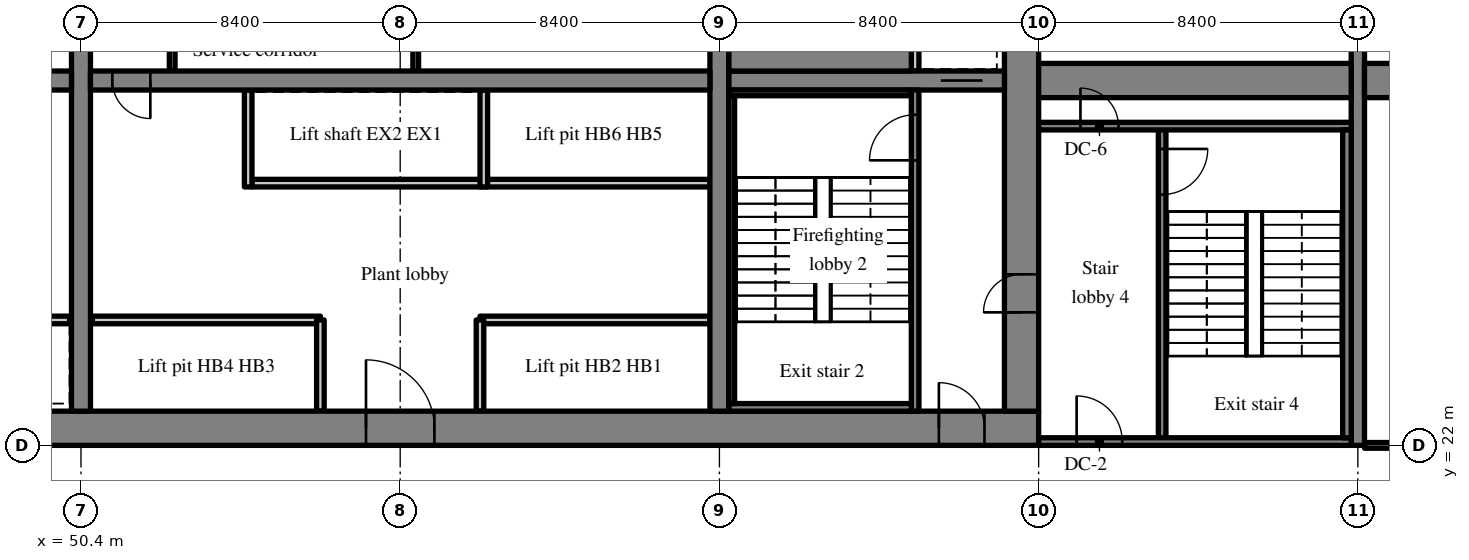
"""IFC4 building model, lengths in metres.
Left out: names, types, materials, properties, quantities, classifications, styles, units other than length and angle.
Written with IfcOpenShell. Run it as: python <this file> out.ifc"""

import sys

from ifc_helpers import new_model, si_unit, direction, frame, frame_2d, origin, place, context, subcontext, project, spatial, rectangle, extrude, source, transform, mapped, element, fill, save


model = new_model("IFC4")
c1 = context("Model", 3, precision=1e-05, world=origin(), true_north=direction((0.0, 1.0)))
c2 = subcontext(c1, "Body", "Model", "MODEL_VIEW")
j1 = project(units=[si_unit("LENGTHUNIT", "METRE"), si_unit("PLANEANGLEUNIT", "RADIAN")], contexts=[c1])
p1 = place(None, origin())
s1 = spatial("IfcSite", under=j1, at=p1, CompositionType="ELEMENT")
p2 = place(p1, origin())
s2 = spatial("IfcBuilding", under=s1, at=p2, CompositionType="ELEMENT")
p3 = place(p2, frame((0.0, 0.0, 140.8)))
s3 = spatial("IfcBuildingStorey", under=s2, at=p3, CompositionType="ELEMENT", Elevation=140.8)
m1 = source(origin(), c2, "Body", "SweptSolid", [
    extrude(rectangle(XDim=50.4, YDim=0.9, at=frame_2d((25.2, 0.0))), origin(), (0.0, 0.0, 1.0), 5.12),
])
p4 = place(p3, frame((25.2, 22.45, 0.0), z_axis=(0.0, 0.0, 1.0), x_axis=(1.0, 0.0, 0.0)))
e1 = element("IfcWall", 1, at=p4, inside=s3, PredefinedType="SHEAR", context=c2, shape_type="MappedRepresentation", body=[
    mapped(m1, transform((0.0, 0.0, 0.0), scale=1.0)),
])
m2 = source(origin(), c2, "Body", "SweptSolid", [
    extrude(rectangle(XDim=1.8, YDim=2.1, at=frame_2d((0.9, 1.05))), frame((0.0, 0.46, 0.0), z_axis=(0.0, -1.0, 0.0), x_axis=(1.0, 0.0, 0.0)), (0.0, 0.0, 1.0), 0.92),
])
p5 = place(p4, frame((15.9, 0.0, 0.0)))
e2 = element("IfcOpeningElement", 2, at=p5, cuts=e1, PredefinedType="OPENING", context=c2, shape_type="MappedRepresentation", body=[
    mapped(m2, transform((0.0, 0.0, 0.0), scale=1.0)),
])
p6 = place(p4, frame((32.7, 0.0, 0.0)))
e3 = element("IfcOpeningElement", 3, at=p6, cuts=e1, PredefinedType="OPENING", context=c2, shape_type="MappedRepresentation", body=[
    mapped(m2, transform((0.0, 0.0, 0.0), scale=1.0)),
])
m3 = source(origin(), c2, "Body", "SweptSolid", [
    extrude(rectangle(XDim=1.2, YDim=2.1, at=frame_2d((0.6, 1.05))), frame((0.0, 0.46, 0.0), z_axis=(0.0, -1.0, 0.0), x_axis=(1.0, 0.0, 0.0)), (0.0, 0.0, 1.0), 0.92),
])
p7 = place(p4, frame((6.45, 0.0, 0.0)))
e4 = element("IfcOpeningElement", 4, at=p7, cuts=e1, PredefinedType="OPENING", context=c2, shape_type="MappedRepresentation", body=[
    mapped(m3, transform((0.0, 0.0, 0.0), scale=1.0)),
])
p8 = place(p4, frame((47.775, 0.0, 0.0)))
e5 = element("IfcOpeningElement", 5, at=p8, cuts=e1, PredefinedType="OPENING", context=c2, shape_type="MappedRepresentation", body=[
    mapped(m3, transform((0.0, 0.0, 0.0), scale=1.0)),
])
m4 = source(origin(), c2, "Body", "SweptSolid", [
    extrude(rectangle(XDim=18.2, YDim=0.9, at=frame_2d((9.1, 0.0))), origin(), (0.0, 0.0, 1.0), 5.12),
])
p9 = place(p3, frame((75.15, 22.9, 0.0), z_axis=(0.0, 0.0, 1.0), x_axis=(0.0, 1.0, 0.0)))
e6 = element("IfcWall", 6, at=p9, inside=s3, PredefinedType="SHEAR", context=c2, shape_type="MappedRepresentation", body=[
    mapped(m4, transform((0.0, 0.0, 0.0), scale=1.0)),
])
m5 = source(origin(), c2, "Body", "SweptSolid", [
    extrude(rectangle(XDim=1.0, YDim=2.1, at=frame_2d((0.5, 1.05))), frame((0.0, 0.46, 0.0), z_axis=(0.0, -1.0, 0.0), x_axis=(1.0, 0.0, 0.0)), (0.0, 0.0, 1.0), 0.92),
])
p10 = place(p9, frame((2.6, 0.0, 0.0)))
e7 = element("IfcOpeningElement", 7, at=p10, cuts=e6, PredefinedType="OPENING", context=c2, shape_type="MappedRepresentation", body=[
    mapped(m5, transform((0.0, 0.0, 0.0), scale=1.0)),
])
p11 = place(p9, frame((12.5, 0.0, 0.0)))
e8 = element("IfcOpeningElement", 8, at=p11, cuts=e6, PredefinedType="OPENING", context=c2, shape_type="MappedRepresentation", body=[
    mapped(m3, transform((0.0, 0.0, 0.0), scale=1.0)),
])
m6 = source(origin(), c2, "Body", "SweptSolid", [
    extrude(rectangle(XDim=18.2, YDim=0.5, at=frame_2d((9.1, 0.0))), origin(), (0.0, 0.0, 1.0), 5.12),
])
p12 = place(p3, frame((50.4, 22.9, 0.0), z_axis=(0.0, 0.0, 1.0), x_axis=(0.0, 1.0, 0.0)))
e9 = element("IfcWall", 9, at=p12, inside=s3, PredefinedType="SHEAR", context=c2, shape_type="MappedRepresentation", body=[
    mapped(m6, transform((0.0, 0.0, 0.0), scale=1.0)),
])
m7 = source(origin(), c2, "Body", "SweptSolid", [
    extrude(rectangle(XDim=1.1, YDim=2.1, at=frame_2d((0.55, 1.05))), frame((0.0, 0.26, 0.0), z_axis=(0.0, -1.0, 0.0), x_axis=(1.0, 0.0, 0.0)), (0.0, 0.0, 1.0), 0.52),
])
p13 = place(p12, frame((12.55, 0.0, 0.0)))
e10 = element("IfcOpeningElement", 10, at=p13, cuts=e9, PredefinedType="OPENING", context=c2, shape_type="MappedRepresentation", body=[
    mapped(m7, transform((0.0, 0.0, 0.0), scale=1.0)),
])
p14 = place(p3, frame((67.2, 22.9, 0.0), z_axis=(0.0, 0.0, 1.0), x_axis=(0.0, 1.0, 0.0)))
e11 = element("IfcWall", 11, at=p14, inside=s3, PredefinedType="SHEAR", context=c2, shape_type="MappedRepresentation", body=[
    mapped(m6, transform((0.0, 0.0, 0.0), scale=1.0)),
])
m8 = source(origin(), c2, "Body", "SweptSolid", [
    extrude(rectangle(XDim=16.3, YDim=0.5, at=frame_2d((8.15, 0.0))), origin(), (0.0, 0.0, 1.0), 5.12),
])
p15 = place(p3, frame((33.85, 31.6, 0.0), z_axis=(0.0, 0.0, 1.0), x_axis=(1.0, 0.0, 0.0)))
e12 = element("IfcWall", 12, at=p15, inside=s3, PredefinedType="SHEAR", context=c2, shape_type="MappedRepresentation", body=[
    mapped(m8, transform((0.0, 0.0, 0.0), scale=1.0)),
])
m9 = source(origin(), c2, "Body", "SweptSolid", [
    extrude(rectangle(XDim=1.0, YDim=2.1, at=frame_2d((0.5, 1.05))), frame((0.0, 0.26, 0.0), z_axis=(0.0, -1.0, 0.0), x_axis=(1.0, 0.0, 0.0)), (0.0, 0.0, 1.0), 0.52),
])
p16 = place(p15, frame((14.725, 0.0, 0.0)))
e13 = element("IfcOpeningElement", 13, at=p16, cuts=e12, PredefinedType="OPENING", context=c2, shape_type="MappedRepresentation", body=[
    mapped(m9, transform((0.0, 0.0, 0.0), scale=1.0)),
])
m10 = source(origin(), c2, "Body", "SweptSolid", [
    extrude(rectangle(XDim=16.3, YDim=0.5, at=frame_2d((8.15, 0.0))), origin(), (0.0, 0.0, 1.0), 5.12),
])
p17 = place(p3, frame((50.65, 31.6, 0.0), z_axis=(0.0, 0.0, 1.0), x_axis=(1.0, 0.0, 0.0)))
e14 = element("IfcWall", 14, at=p17, inside=s3, PredefinedType="SHEAR", context=c2, shape_type="MappedRepresentation", body=[
    mapped(m10, transform((0.0, 0.0, 0.0), scale=1.0)),
])
p18 = place(p17, frame((0.575, 0.0, 0.0)))
e15 = element("IfcOpeningElement", 15, at=p18, cuts=e14, PredefinedType="OPENING", context=c2, shape_type="MappedRepresentation", body=[
    mapped(m9, transform((0.0, 0.0, 0.0), scale=1.0)),
])
m11 = source(origin(), c2, "Body", "SweptSolid", [
    extrude(rectangle(XDim=7.25, YDim=0.5, at=frame_2d((3.625, 0.0))), origin(), (0.0, 0.0, 1.0), 5.12),
])
p19 = place(p3, frame((67.45, 31.6, 0.0), z_axis=(0.0, 0.0, 1.0), x_axis=(1.0, 0.0, 0.0)))
e16 = element("IfcWall", 16, at=p19, inside=s3, PredefinedType="SHEAR", context=c2, shape_type="MappedRepresentation", body=[
    mapped(m11, transform((0.0, 0.0, 0.0), scale=1.0)),
])
p20 = place(p19, frame((5.575, 0.0, 0.0)))
e17 = element("IfcOpeningElement", 17, at=p20, cuts=e16, PredefinedType="OPENING", context=c2, shape_type="MappedRepresentation", body=[
    mapped(m7, transform((0.0, 0.0, 0.0), scale=1.0)),
])
m12 = source(origin(), c2, "Body", "SweptSolid", [
    extrude(rectangle(XDim=20.0, YDim=0.35, at=frame_2d((10.0, 0.0))), origin(), (0.0, 0.0, 1.0), 5.12),
])
p21 = place(p3, frame((84.0, 22.0, 0.0), z_axis=(0.0, 0.0, 1.0), x_axis=(0.0, 1.0, 0.0)))
e18 = element("IfcWall", 18, at=p21, inside=s3, PredefinedType="SHEAR", context=c2, shape_type="MappedRepresentation", body=[
    mapped(m12, transform((0.0, 0.0, 0.0), scale=1.0)),
])
m13 = source(origin(), c2, "Body", "SweptSolid", [
    extrude(rectangle(XDim=1.2, YDim=2.1, at=frame_2d((0.6, 1.05))), frame((0.0, 0.185, 0.0), z_axis=(0.0, -1.0, 0.0), x_axis=(1.0, 0.0, 0.0)), (0.0, 0.0, 1.0), 0.37),
])
p22 = place(p21, frame((13.4, 0.0, 0.0)))
e19 = element("IfcOpeningElement", 19, at=p22, cuts=e18, PredefinedType="OPENING", context=c2, shape_type="MappedRepresentation", body=[
    mapped(m13, transform((0.0, 0.0, 0.0), scale=1.0)),
])
m14 = source(origin(), c2, "Body", "SweptSolid", [
    extrude(rectangle(XDim=8.225, YDim=0.9, at=frame_2d((4.112, 0.0))), origin(), (0.0, 0.0, 1.0), 5.12),
])
p23 = place(p3, frame((75.6, 31.6, 0.0), z_axis=(0.0, 0.0, 1.0), x_axis=(1.0, 0.0, 0.0)))
e20 = element("IfcWall", 20, at=p23, inside=s3, PredefinedType="SHEAR", context=c2, shape_type="MappedRepresentation", body=[
    mapped(m14, transform((0.0, 0.0, 0.0), scale=1.0)),
])
m15 = source(origin(), c2, "Body", "SweptSolid", [
    extrude(rectangle(XDim=8.05, YDim=0.9, at=frame_2d((4.025, 0.0))), origin(), (0.0, 0.0, 1.0), 5.12),
])
p24 = place(p3, frame((84.175, 31.6, 0.0), z_axis=(0.0, 0.0, 1.0), x_axis=(1.0, 0.0, 0.0)))
e21 = element("IfcWall", 21, at=p24, inside=s3, PredefinedType="SHEAR", context=c2, shape_type="MappedRepresentation", body=[
    mapped(m15, transform((0.0, 0.0, 0.0), scale=1.0)),
])
m16 = source(origin(), c2, "Body", "SweptSolid", [
    extrude(rectangle(XDim=6.0, YDim=0.2, at=frame_2d((3.0, 0.0))), origin(), (0.0, 0.0, 1.0), 5.12),
])
p25 = place(p3, frame((44.1, 25.3, 0.0), z_axis=(0.0, 0.0, 1.0), x_axis=(1.0, 0.0, 0.0)))
e22 = element("IfcWall", 22, at=p25, inside=s3, PredefinedType="SOLIDWALL", context=c2, shape_type="MappedRepresentation", body=[
    mapped(m16, transform((0.0, 0.0, 0.0), scale=1.0)),
])
m17 = source(origin(), c2, "Body", "SweptSolid", [
    extrude(rectangle(XDim=6.05, YDim=0.2, at=frame_2d((3.025, 0.0))), origin(), (0.0, 0.0, 1.0), 5.12),
])
p26 = place(p3, frame((66.95, 25.3, 0.0), z_axis=(0.0, 0.0, 1.0), x_axis=(-1.0, 0.0, 0.0)))
e23 = element("IfcWall", 23, at=p26, inside=s3, PredefinedType="SOLIDWALL", context=c2, shape_type="MappedRepresentation", body=[
    mapped(m17, transform((0.0, 0.0, 0.0), scale=1.0)),
])
p27 = place(p3, frame((56.7, 25.3, 0.0), z_axis=(0.0, 0.0, 1.0), x_axis=(-1.0, 0.0, 0.0)))
e24 = element("IfcWall", 24, at=p27, inside=s3, PredefinedType="SOLIDWALL", context=c2, shape_type="MappedRepresentation", body=[
    mapped(m16, transform((0.0, 0.0, 0.0), scale=1.0)),
])
m18 = source(origin(), c2, "Body", "SweptSolid", [
    extrude(rectangle(XDim=12.05, YDim=0.2, at=frame_2d((6.025, 0.0))), origin(), (0.0, 0.0, 1.0), 5.12),
])
p28 = place(p3, frame((66.95, 28.9, 0.0), z_axis=(0.0, 0.0, 1.0), x_axis=(-1.0, 0.0, 0.0)))
e25 = element("IfcWall", 25, at=p28, inside=s3, PredefinedType="SOLIDWALL", context=c2, shape_type="MappedRepresentation", body=[
    mapped(m18, transform((0.0, 0.0, 0.0), scale=1.0)),
])
m19 = source(origin(), c2, "Body", "SweptSolid", [
    extrude(rectangle(XDim=2.4, YDim=0.2, at=frame_2d((1.2, 0.0))), origin(), (0.0, 0.0, 1.0), 5.12),
])
for number, where, z_axis, x_axis in (
    (26, (60.9, 22.9, 0.0), (0.0, 0.0, 1.0), (0.0, 1.0, 0.0)),
    (27, (56.7, 22.9, 0.0), (0.0, 0.0, 1.0), (0.0, 1.0, 0.0)),
):
    element("IfcWall", number, at=place(p3, frame(where, z_axis=z_axis, x_axis=x_axis)), inside=s3, PredefinedType="SOLIDWALL", context=c2, shape_type="MappedRepresentation", body=[
        mapped(m19, transform((0.0, 0.0, 0.0), scale=1.0)),
    ])
m20 = source(origin(), c2, "Body", "SweptSolid", [
    extrude(rectangle(XDim=2.55, YDim=0.2, at=frame_2d((1.275, 0.0))), origin(), (0.0, 0.0, 1.0), 5.12),
])
for number, where, z_axis, x_axis in (
    (28, (54.8, 28.8, 0.0), (0.0, 0.0, 1.0), (0.0, 1.0, 0.0)),
    (29, (61.0, 28.8, 0.0), (0.0, 0.0, 1.0), (0.0, 1.0, 0.0)),
):
    element("IfcWall", number, at=place(p3, frame(where, z_axis=z_axis, x_axis=x_axis)), inside=s3, PredefinedType="SOLIDWALL", context=c2, shape_type="MappedRepresentation", body=[
        mapped(m20, transform((0.0, 0.0, 0.0), scale=1.0)),
    ])
m21 = source(origin(), c2, "Body", "SweptSolid", [
    extrude(rectangle(XDim=3.15, YDim=0.15, at=frame_2d((1.575, 0.0))), origin(), (0.0, 0.0, 1.0), 5.12),
])
for number, where, z_axis, x_axis in (
    (30, (52.8, 31.85, 0.0), (0.0, 0.0, 1.0), (0.0, 1.0, 0.0)),
    (31, (59.209, 31.85, 0.0), (0.0, 0.0, 1.0), (0.0, 1.0, 0.0)),
):
    element("IfcWall", number, at=place(p3, frame(where, z_axis=z_axis, x_axis=x_axis)), inside=s3, PredefinedType="PARTITIONING", context=c2, shape_type="MappedRepresentation", body=[
        mapped(m21, transform((0.0, 0.0, 0.0), scale=1.0)),
    ])
m22 = source(origin(), c2, "Body", "SweptSolid", [
    extrude(rectangle(XDim=8.45, YDim=0.2, at=frame_2d((4.225, 0.0))), origin(), (0.0, 0.0, 1.0), 5.12),
])
p29 = place(p3, frame((72.35, 22.9, 0.0), z_axis=(0.0, 0.0, 1.0), x_axis=(0.0, 1.0, 0.0)))
e32 = element("IfcWall", 32, at=p29, inside=s3, PredefinedType="SOLIDWALL", context=c2, shape_type="MappedRepresentation", body=[
    mapped(m22, transform((0.0, 0.0, 0.0), scale=1.0)),
])
m23 = source(origin(), c2, "Body", "SweptSolid", [
    extrude(rectangle(XDim=1.2, YDim=2.1, at=frame_2d((0.6, 1.05))), frame((0.0, 0.11, 0.0), z_axis=(0.0, -1.0, 0.0), x_axis=(1.0, 0.0, 0.0)), (0.0, 0.0, 1.0), 0.22),
])
p30 = place(p29, frame((6.6, 0.0, 0.0)))
e33 = element("IfcOpeningElement", 33, at=p30, cuts=e32, PredefinedType="OPENING", context=c2, shape_type="MappedRepresentation", body=[
    mapped(m23, transform((0.0, 0.0, 0.0), scale=1.0)),
])
m24 = source(origin(), c2, "Body", "SweptSolid", [
    extrude(rectangle(XDim=1.75, YDim=0.2, at=frame_2d((0.875, 0.0))), origin(), (0.0, 0.0, 1.0), 5.12),
])
p31 = place(p3, frame((72.35, 31.85, 0.0), z_axis=(0.0, 0.0, 1.0), x_axis=(0.0, 1.0, 0.0)))
e34 = element("IfcWall", 34, at=p31, inside=s3, PredefinedType="SOLIDWALL", context=c2, shape_type="MappedRepresentation", body=[
    mapped(m24, transform((0.0, 0.0, 0.0), scale=1.0)),
])
m25 = source(origin(), c2, "Body", "SweptSolid", [
    extrude(rectangle(XDim=8.3, YDim=0.2, at=frame_2d((4.15, 0.0))), origin(), (0.0, 0.0, 1.0), 5.12),
])
p32 = place(p3, frame((78.85, 22.1, 0.0), z_axis=(0.0, 0.0, 1.0), x_axis=(0.0, 1.0, 0.0)))
e35 = element("IfcWall", 35, at=p32, inside=s3, PredefinedType="SOLIDWALL", context=c2, shape_type="MappedRepresentation", body=[
    mapped(m25, transform((0.0, 0.0, 0.0), scale=1.0)),
])
p33 = place(p32, frame((6.5, 0.0, 0.0)))
e36 = element("IfcOpeningElement", 36, at=p33, cuts=e35, PredefinedType="OPENING", context=c2, shape_type="MappedRepresentation", body=[
    mapped(m23, transform((0.0, 0.0, 0.0), scale=1.0)),
])
m26 = source(origin(), c2, "Body", "SweptSolid", [
    extrude(rectangle(XDim=8.225, YDim=0.2, at=frame_2d((4.112, 0.0))), origin(), (0.0, 0.0, 1.0), 5.12),
])
p34 = place(p3, frame((83.825, 22.1, 0.0), z_axis=(0.0, 0.0, 1.0), x_axis=(-1.0, 0.0, 0.0)))
e37 = element("IfcWall", 37, at=p34, inside=s3, PredefinedType="SOLIDWALL", context=c2, shape_type="MappedRepresentation", body=[
    mapped(m26, transform((0.0, 0.0, 0.0), scale=1.0)),
])
p35 = place(p34, frame((6.025, 0.0, 0.0)))
e38 = element("IfcOpeningElement", 38, at=p35, cuts=e37, PredefinedType="OPENING", context=c2, shape_type="MappedRepresentation", body=[
    mapped(m23, transform((0.0, 0.0, 0.0), scale=1.0)),
])
p36 = place(p3, frame((83.825, 30.4, 0.0), z_axis=(0.0, 0.0, 1.0), x_axis=(-1.0, 0.0, 0.0)))
e39 = element("IfcWall", 39, at=p36, inside=s3, PredefinedType="SOLIDWALL", context=c2, shape_type="MappedRepresentation", body=[
    mapped(m26, transform((0.0, 0.0, 0.0), scale=1.0)),
])
m27 = source(origin(), c2, "Body", "SweptSolid", [
    extrude(rectangle(XDim=1.0, YDim=2.1, at=frame_2d((0.5, 1.05))), frame((0.0, 0.11, 0.0), z_axis=(0.0, -1.0, 0.0), x_axis=(1.0, 0.0, 0.0)), (0.0, 0.0, 1.0), 0.22),
])
p37 = place(p36, frame((6.125, 0.0, 0.0)))
e40 = element("IfcOpeningElement", 40, at=p37, cuts=e39, PredefinedType="OPENING", context=c2, shape_type="MappedRepresentation", body=[
    mapped(m27, transform((0.0, 0.0, 0.0), scale=1.0)),
])
m28 = source(origin(), c2, "Body", "SweptSolid", [
    extrude(rectangle(XDim=4.8, YDim=0.2, at=frame_2d((2.4, 0.0))), origin(), (0.0, 0.0, 1.0), 5.12),
])
p38 = place(p3, frame((67.45, 23.0, 0.0), z_axis=(0.0, 0.0, 1.0), x_axis=(1.0, 0.0, 0.0)))
e41 = element("IfcWall", 41, at=p38, inside=s3, PredefinedType="SOLIDWALL", context=c2, shape_type="MappedRepresentation", body=[
    mapped(m28, transform((0.0, 0.0, 0.0), scale=1.0)),
])
m29 = source(origin(), c2, "Body", "SweptSolid", [
    extrude(rectangle(XDim=4.8, YDim=0.15, at=frame_2d((2.4, 0.0))), origin(), (0.0, 0.0, 1.0), 5.12),
])
p39 = place(p3, frame((67.45, 31.275, 0.0), z_axis=(0.0, 0.0, 1.0), x_axis=(1.0, 0.0, 0.0)))
e42 = element("IfcWall", 42, at=p39, inside=s3, PredefinedType="SOLIDWALL", context=c2, shape_type="MappedRepresentation", body=[
    mapped(m29, transform((0.0, 0.0, 0.0), scale=1.0)),
])
m30 = source(origin(), c2, "Body", "SweptSolid", [
    extrude(rectangle(XDim=8.1, YDim=0.15, at=frame_2d((4.05, 0.0))), origin(), (0.0, 0.0, 1.0), 5.12),
])
p40 = place(p3, frame((67.525, 23.1, 0.0), z_axis=(0.0, 0.0, 1.0), x_axis=(0.0, 1.0, 0.0)))
e43 = element("IfcWall", 43, at=p40, inside=s3, PredefinedType="SOLIDWALL", context=c2, shape_type="MappedRepresentation", body=[
    mapped(m30, transform((0.0, 0.0, 0.0), scale=1.0)),
])
m31 = source(origin(), c2, "Body", "SweptSolid", [
    extrude(rectangle(XDim=4.8, YDim=0.95, at=frame_2d((2.4, 0.0))), origin(), (0.0, 0.0, 1.0), 5.12),
])
p41 = place(p3, frame((67.45, 32.325, 0.0), z_axis=(0.0, 0.0, 1.0), x_axis=(1.0, 0.0, 0.0)))
e44 = element("IfcWall", 44, at=p41, inside=s3, PredefinedType="SOLIDWALL", context=c2, shape_type="MappedRepresentation", body=[
    mapped(m31, transform((0.0, 0.0, 0.0), scale=1.0)),
])
m32 = source(origin(), c2, "Body", "SweptSolid", [
    extrude(rectangle(XDim=8.1, YDim=0.225, at=frame_2d((4.05, 0.0))), origin(), (0.0, 0.0, 1.0), 5.12),
])
p42 = place(p3, frame((83.713, 22.2, 0.0), z_axis=(0.0, 0.0, 1.0), x_axis=(0.0, 1.0, 0.0)))
e45 = element("IfcWall", 45, at=p42, inside=s3, PredefinedType="SOLIDWALL", context=c2, shape_type="MappedRepresentation", body=[
    mapped(m32, transform((0.0, 0.0, 0.0), scale=1.0)),
])
m33 = source(origin(), c2, "Body", "SweptSolid", [
    extrude(rectangle(XDim=8.05, YDim=0.15, at=frame_2d((4.025, 0.0))), origin(), (0.0, 0.0, 1.0), 4.37),
])
p43 = place(p3, frame((84.175, 22.0, 0.0), z_axis=(0.0, 0.0, 1.0), x_axis=(1.0, 0.0, 0.0)))
e46 = element("IfcWall", 46, at=p43, inside=s3, PredefinedType="PARTITIONING", context=c2, shape_type="MappedRepresentation", body=[
    mapped(m33, transform((0.0, 0.0, 0.0), scale=1.0)),
])
m34 = source(origin(), c2, "Body", "SweptSolid", [
    extrude(rectangle(XDim=1.2, YDim=2.1, at=frame_2d((0.6, 1.05))), frame((0.0, 0.085, 0.0), z_axis=(0.0, -1.0, 0.0), x_axis=(1.0, 0.0, 0.0)), (0.0, 0.0, 1.0), 0.17),
])
p44 = place(p43, frame((3.425, 0.0, 0.0)))
e47 = element("IfcOpeningElement", 47, at=p44, cuts=e46, PredefinedType="OPENING", context=c2, shape_type="MappedRepresentation", body=[
    mapped(m34, transform((0.0, 0.0, 0.0), scale=1.0)),
])
m35 = source(origin(), c2, "Body", "SweptSolid", [
    extrude(rectangle(XDim=1.8, YDim=2.1, at=frame_2d((0.9, 1.05))), frame((0.0, 0.375, 0.0), z_axis=(0.0, -1.0, 0.0), x_axis=(1.0, 0.0, 0.0)), (0.0, 0.0, 1.0), 0.05),
])
p45 = place(p6, origin())
e48 = element("IfcDoor", 48, at=p45, inside=s3, OperationType="DOUBLE_DOOR_SINGLE_SWING", PredefinedType="DOOR", context=c2, shape_type="MappedRepresentation", body=[
    mapped(m35, transform((0.0, 0.0, 0.0), scale=1.0)),
])
fill(e3, e48)
m36 = source(origin(), c2, "Body", "SweptSolid", [
    extrude(rectangle(XDim=1.0, YDim=2.1, at=frame_2d((0.5, 1.05))), frame((0.0, 0.025, 0.0), z_axis=(0.0, -1.0, 0.0), x_axis=(1.0, 0.0, 0.0)), (0.0, 0.0, 1.0), 0.05),
])
p46 = place(p18, origin())
e49 = element("IfcDoor", 49, at=p46, inside=s3, OperationType="SINGLE_SWING_RIGHT", PredefinedType="DOOR", context=c2, shape_type="MappedRepresentation", body=[
    mapped(m36, transform((0.0, 0.0, 0.0), scale=1.0)),
])
fill(e15, e49)
m37 = source(origin(), c2, "Body", "SweptSolid", [
    extrude(rectangle(XDim=1.2, YDim=2.1, at=frame_2d((0.6, 1.05))), frame((0.0, 0.025, 0.0), z_axis=(0.0, -1.0, 0.0), x_axis=(1.0, 0.0, 0.0)), (0.0, 0.0, 1.0), 0.05),
])
p47 = place(p30, origin())
e50 = element("IfcDoor", 50, at=p47, inside=s3, OperationType="SINGLE_SWING_LEFT", PredefinedType="DOOR", context=c2, shape_type="MappedRepresentation", body=[
    mapped(m37, transform((0.0, 0.0, 0.0), scale=1.0)),
])
fill(e33, e50)
m38 = source(origin(), c2, "Body", "SweptSolid", [
    extrude(rectangle(XDim=1.2, YDim=2.1, at=frame_2d((0.6, 1.05))), frame((0.0, 0.375, 0.0), z_axis=(0.0, -1.0, 0.0), x_axis=(1.0, 0.0, 0.0)), (0.0, 0.0, 1.0), 0.05),
])
p48 = place(p8, origin())
e51 = element("IfcDoor", 51, at=p48, inside=s3, OperationType="SINGLE_SWING_LEFT", PredefinedType="DOOR", context=c2, shape_type="MappedRepresentation", body=[
    mapped(m38, transform((0.0, 0.0, 0.0), scale=1.0)),
])
fill(e5, e51)
m39 = source(origin(), c2, "Body", "SweptSolid", [
    extrude(rectangle(XDim=1.1, YDim=2.1, at=frame_2d((0.55, 1.05))), frame((0.0, 0.025, 0.0), z_axis=(0.0, -1.0, 0.0), x_axis=(1.0, 0.0, 0.0)), (0.0, 0.0, 1.0), 0.05),
])
p49 = place(p20, origin())
e52 = element("IfcDoor", 52, at=p49, inside=s3, OperationType="SLIDING_TO_RIGHT", PredefinedType="DOOR", context=c2, shape_type="MappedRepresentation", body=[
    mapped(m39, transform((0.0, 0.0, 0.0), scale=1.0)),
])
fill(e17, e52)
p50 = place(p10, origin())
e53 = element("IfcDoor", 53, at=p50, inside=s3, OperationType="SINGLE_SWING_LEFT", PredefinedType="DOOR", context=c2, shape_type="MappedRepresentation", body=[
    mapped(m36, transform((0.0, 0.0, 0.0), scale=1.0)),
])
fill(e7, e53)
p51 = place(p33, origin())
e54 = element("IfcDoor", 54, at=p51, inside=s3, OperationType="SINGLE_SWING_RIGHT", PredefinedType="DOOR", context=c2, shape_type="MappedRepresentation", body=[
    mapped(m37, transform((0.0, 0.0, 0.0), scale=1.0)),
])
fill(e36, e54)
p52 = place(p35, origin())
e55 = element("IfcDoor", 55, at=p52, inside=s3, OperationType="SINGLE_SWING_RIGHT", PredefinedType="DOOR", context=c2, shape_type="MappedRepresentation", body=[
    mapped(m37, transform((0.0, 0.0, 0.0), scale=1.0)),
])
fill(e38, e55)
p53 = place(p37, origin())
e56 = element("IfcDoor", 56, at=p53, inside=s3, OperationType="SINGLE_SWING_RIGHT", PredefinedType="DOOR", context=c2, shape_type="MappedRepresentation", body=[
    mapped(m36, transform((0.0, 0.0, 0.0), scale=1.0)),
])
fill(e40, e56)
save(model, sys.argv[1])
